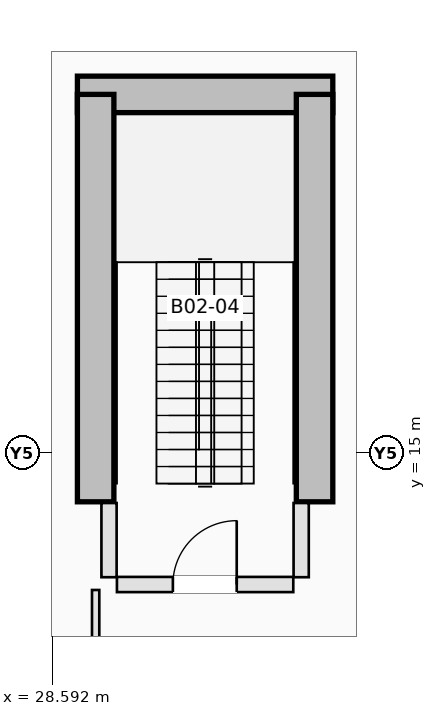
"""IFC4 building model, lengths in metres.
Left out: names, types, materials, properties, quantities, classifications, styles, units other than length and angle.
Written with IfcOpenShell. Run it as: python <this file> out.ifc"""

import sys

from ifc_helpers import new_model, si_unit, direction, frame, frame_2d, origin, place, context, subcontext, project, spatial, rectangle, extrude, element, fill, save


model = new_model("IFC4")
c1 = context("Model", 3, precision=1e-05, world=origin(), true_north=direction((0.0, 1.0)))
c2 = subcontext(c1, "Body", "Model", "MODEL_VIEW")
j1 = project(units=[si_unit("LENGTHUNIT", "METRE"), si_unit("PLANEANGLEUNIT", "RADIAN")], contexts=[c1])
p1 = place(None, origin())
s1 = spatial("IfcSite", under=j1, at=p1, CompositionType="ELEMENT")
p2 = place(p1, origin())
s2 = spatial("IfcBuilding", under=s1, at=p2, CompositionType="ELEMENT")
p3 = place(p2, frame((0.0, 0.0, -10.0)))
s3 = spatial("IfcBuildingStorey", under=s2, at=p3, CompositionType="ELEMENT", Elevation=-10.0)
p4 = place(p3, frame((29.0, 20.9, 0.0), z_axis=(0.0, 0.0, 1.0), x_axis=(1.0, 0.0, 0.0)))
e1 = element("IfcWall", 1, at=p4, inside=s3, PredefinedType="SHEAR", context=c2, shape_type="SweptSolid", body=[
    extrude(rectangle(XDim=4.2, YDim=0.6, at=frame_2d((2.1, 0.0))), origin(), (0.0, 0.0, 1.0), 5.0),
])
for number, where, z_axis, x_axis in (
    (2, (29.3, 14.2, 0.0), (0.0, 0.0, 1.0), (0.0, 1.0, 0.0)),
    (3, (32.9, 14.2, 0.0), (0.0, 0.0, 1.0), (0.0, 1.0, 0.0)),
):
    element("IfcWall", number, at=place(p3, frame(where, z_axis=z_axis, x_axis=x_axis)), inside=s3, PredefinedType="SHEAR", context=c2, shape_type="SweptSolid", body=[
        extrude(rectangle(XDim=6.7, YDim=0.6, at=frame_2d((3.35, 0.0))), origin(), (0.0, 0.0, 1.0), 5.0),
    ])
p5 = place(p3, frame((29.65, 12.84, 0.0), z_axis=(0.0, 0.0, 1.0), x_axis=(1.0, 0.0, 0.0)))
e4 = element("IfcWall", 4, at=p5, inside=s3, PredefinedType="PARTITIONING", context=c2, shape_type="SweptSolid", body=[
    extrude(rectangle(XDim=2.9, YDim=0.25, at=frame_2d((1.45, 0.0))), origin(), (0.0, 0.0, 1.0), 4.68),
])
p6 = place(p5, frame((0.92, 0.0, 0.0)))
e5 = element("IfcOpeningElement", 5, at=p6, cuts=e4, PredefinedType="OPENING", context=c2, shape_type="SweptSolid", body=[
    extrude(rectangle(XDim=1.05, YDim=2.15, at=frame_2d((0.525, 1.075))), frame((0.0, 0.135, 0.0), z_axis=(0.0, -1.0, 0.0), x_axis=(1.0, 0.0, 0.0)), (0.0, 0.0, 1.0), 0.27),
])
for number, where, z_axis, x_axis in (
    (6, (29.52, 12.96, 0.0), (0.0, 0.0, 1.0), (0.0, 1.0, 0.0)),
    (7, (32.68, 12.96, 0.0), (0.0, 0.0, 1.0), (0.0, 1.0, 0.0)),
):
    element("IfcWall", number, at=place(p3, frame(where, z_axis=z_axis, x_axis=x_axis)), inside=s3, PredefinedType="PARTITIONING", context=c2, shape_type="SweptSolid", body=[
        extrude(rectangle(XDim=1.22, YDim=0.25, at=frame_2d((0.61, 0.0))), origin(), (0.0, 0.0, 1.0), 4.68),
    ])
p7 = place(p3, frame((29.3, -2.338, 0.0), z_axis=(0.0, 0.0, 1.0), x_axis=(0.0, 1.0, 0.0)))
e8 = element("IfcWall", 8, at=p7, inside=s3, PredefinedType="PARTITIONING", context=c2, shape_type="SweptSolid", body=[
    extrude(rectangle(XDim=15.088, YDim=0.12, at=frame_2d((7.544, 0.0))), origin(), (0.0, 0.0, 1.0), 4.68),
])
p8 = place(p6, origin())
e9 = element("IfcDoor", 9, at=p8, inside=s3, OperationType="SINGLE_SWING_RIGHT", PredefinedType="DOOR", context=c2, shape_type="SweptSolid", body=[
    extrude(rectangle(XDim=1.05, YDim=2.15, at=frame_2d((0.525, 1.075))), frame((0.0, 0.025, 0.0), z_axis=(0.0, -1.0, 0.0), x_axis=(1.0, 0.0, 0.0)), (0.0, 0.0, 1.0), 0.05),
])
fill(e5, e9)
save(model, sys.argv[1])
